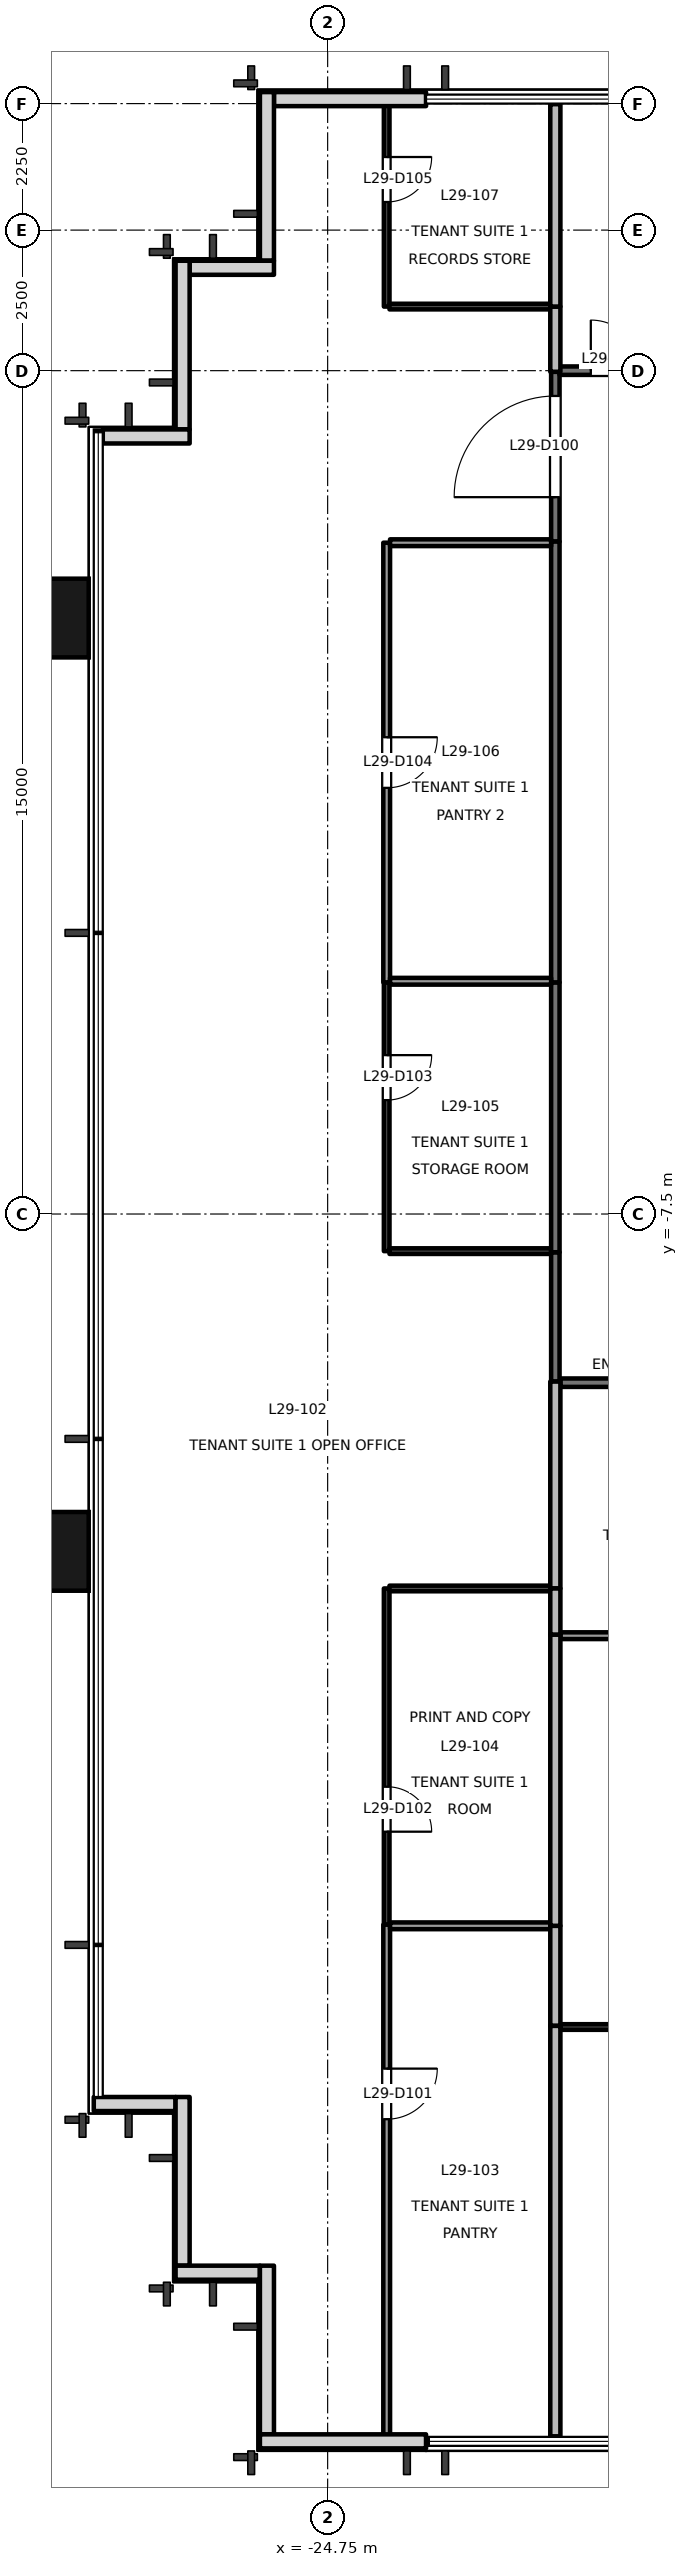
"""IFC4 building model, lengths in metres.
Left out: names, types, materials, properties, quantities, classifications, styles, units other than length and angle.
Written with IfcOpenShell. Run it as: python <this file> out.ifc"""

import sys

from ifc_helpers import new_model, si_unit, direction, frame, frame_2d, origin, origin_2d, place, context, subcontext, project, spatial, rectangle, extrude, element, fill, save


model = new_model("IFC4")
c1 = context("Model", 3, precision=1e-05, world=origin(), true_north=direction((0.0, 1.0)))
c2 = subcontext(c1, "Body", "Model", "MODEL_VIEW")
j1 = project(units=[si_unit("LENGTHUNIT", "METRE"), si_unit("PLANEANGLEUNIT", "RADIAN")], contexts=[c1])
p1 = place(None, origin())
s1 = spatial("IfcSite", under=j1, at=p1, CompositionType="ELEMENT")
p2 = place(p1, origin())
s2 = spatial("IfcBuilding", under=s1, at=p2, CompositionType="ELEMENT")
p3 = place(p2, frame((0.0, 0.0, 130.1)))
s3 = spatial("IfcBuildingStorey", under=s2, at=p3, CompositionType="ELEMENT", Elevation=130.1)
for number, where, z_axis, x_axis in (
    (1, (-29.9, -13.5, -0.2), (0.0, 0.0, 1.0), (0.0, 1.0, 0.0)),
    (2, (-29.9, 3.1, -0.2), (0.0, 0.0, 1.0), (0.0, 1.0, 0.0)),
):
    element("IfcColumn", number, at=place(p3, frame(where, z_axis=z_axis, x_axis=x_axis)), inside=s3, PredefinedType="COLUMN", context=c2, shape_type="SweptSolid", body=[
        extrude(rectangle(XDim=1.4, YDim=1.8, at=origin_2d()), origin(), (0.0, 0.0, 1.0), 4.0),
    ])
p4 = place(p3, frame((-23.0, 12.33, 0.0), z_axis=(0.0, 0.0, 1.0), x_axis=(-1.0, 0.0, 0.0)))
e3 = element("IfcWall", 3, at=p4, inside=s3, PredefinedType="SOLIDWALL", context=c2, shape_type="SweptSolid", body=[
    extrude(rectangle(XDim=2.705, YDim=0.25, at=frame_2d((1.353, 0.0))), origin(), (0.0, 0.0, 1.0), 3.8),
])
p5 = place(p3, frame((-25.83, 12.455, 0.0), z_axis=(0.0, 0.0, 1.0), x_axis=(0.0, -1.0, 0.0)))
e4 = element("IfcWall", 4, at=p5, inside=s3, PredefinedType="SOLIDWALL", context=c2, shape_type="SweptSolid", body=[
    extrude(rectangle(XDim=3.0, YDim=0.25, at=frame_2d((1.5, 0.0))), origin(), (0.0, 0.0, 1.0), 3.8),
])
p6 = place(p3, frame((-25.705, 9.33, 0.0), z_axis=(0.0, 0.0, 1.0), x_axis=(-1.0, 0.0, 0.0)))
e5 = element("IfcWall", 5, at=p6, inside=s3, PredefinedType="SOLIDWALL", context=c2, shape_type="SweptSolid", body=[
    extrude(rectangle(XDim=1.5, YDim=0.25, at=frame_2d((0.75, 0.0))), origin(), (0.0, 0.0, 1.0), 3.8),
])
p7 = place(p3, frame((-27.33, 9.455, 0.0), z_axis=(0.0, 0.0, 1.0), x_axis=(0.0, -1.0, 0.0)))
e6 = element("IfcWall", 6, at=p7, inside=s3, PredefinedType="SOLIDWALL", context=c2, shape_type="SweptSolid", body=[
    extrude(rectangle(XDim=3.0, YDim=0.25, at=frame_2d((1.5, 0.0))), origin(), (0.0, 0.0, 1.0), 3.8),
])
p8 = place(p3, frame((-27.205, 6.33, 0.0), z_axis=(0.0, 0.0, 1.0), x_axis=(-1.0, 0.0, 0.0)))
e7 = element("IfcWall", 7, at=p8, inside=s3, PredefinedType="SOLIDWALL", context=c2, shape_type="SweptSolid", body=[
    extrude(rectangle(XDim=1.545, YDim=0.25, at=frame_2d((0.772, 0.0))), origin(), (0.0, 0.0, 1.0), 3.8),
])
p9 = place(p3, frame((-28.91, -23.33, 0.0), z_axis=(0.0, 0.0, 1.0), x_axis=(1.0, 0.0, 0.0)))
e8 = element("IfcWall", 8, at=p9, inside=s3, PredefinedType="SOLIDWALL", context=c2, shape_type="SweptSolid", body=[
    extrude(rectangle(XDim=1.455, YDim=0.25, at=frame_2d((0.728, 0.0))), origin(), (0.0, 0.0, 1.0), 3.8),
])
p10 = place(p3, frame((-27.33, -23.205, 0.0), z_axis=(0.0, 0.0, 1.0), x_axis=(0.0, -1.0, 0.0)))
e9 = element("IfcWall", 9, at=p10, inside=s3, PredefinedType="SOLIDWALL", context=c2, shape_type="SweptSolid", body=[
    extrude(rectangle(XDim=3.0, YDim=0.25, at=frame_2d((1.5, 0.0))), origin(), (0.0, 0.0, 1.0), 3.8),
])
p11 = place(p3, frame((-27.455, -26.33, 0.0), z_axis=(0.0, 0.0, 1.0), x_axis=(1.0, 0.0, 0.0)))
e10 = element("IfcWall", 10, at=p11, inside=s3, PredefinedType="SOLIDWALL", context=c2, shape_type="SweptSolid", body=[
    extrude(rectangle(XDim=1.5, YDim=0.25, at=frame_2d((0.75, 0.0))), origin(), (0.0, 0.0, 1.0), 3.8),
])
p12 = place(p3, frame((-25.83, -26.205, 0.0), z_axis=(0.0, 0.0, 1.0), x_axis=(0.0, -1.0, 0.0)))
e11 = element("IfcWall", 11, at=p12, inside=s3, PredefinedType="SOLIDWALL", context=c2, shape_type="SweptSolid", body=[
    extrude(rectangle(XDim=3.0, YDim=0.25, at=frame_2d((1.5, 0.0))), origin(), (0.0, 0.0, 1.0), 3.8),
])
p13 = place(p3, frame((-25.955, -29.33, 0.0), z_axis=(0.0, 0.0, 1.0), x_axis=(1.0, 0.0, 0.0)))
e12 = element("IfcWall", 12, at=p13, inside=s3, PredefinedType="SOLIDWALL", context=c2, shape_type="SweptSolid", body=[
    extrude(rectangle(XDim=2.955, YDim=0.25, at=frame_2d((1.478, 0.0))), origin(), (0.0, 0.0, 1.0), 3.8),
])
p14 = place(p3, frame((-20.7, -10.48, 0.0), z_axis=(0.0, 0.0, 1.0), x_axis=(0.0, 1.0, 0.0)))
e13 = element("IfcWall", 13, at=p14, inside=s3, PredefinedType="PARTITIONING", context=c2, shape_type="SweptSolid", body=[
    extrude(rectangle(XDim=2.3, YDim=0.15, at=frame_2d((1.15, 0.0))), origin(), (0.0, 0.0, 1.0), 3.8),
])
p15 = place(p3, frame((-20.7, 4.46, 0.0), z_axis=(0.0, 0.0, 1.0), x_axis=(0.0, 1.0, 0.0)))
e14 = element("IfcWall", 14, at=p15, inside=s3, PredefinedType="PARTITIONING", context=c2, shape_type="SweptSolid", body=[
    extrude(rectangle(XDim=3.02, YDim=0.15, at=frame_2d((1.51, 0.0))), origin(), (0.0, 0.0, 1.0), 3.3),
])
p16 = place(p15, frame((0.79, 0.0, 0.0)))
e15 = element("IfcOpeningElement", 15, at=p16, cuts=e14, PredefinedType="OPENING", context=c2, shape_type="SweptSolid", body=[
    extrude(rectangle(XDim=1.8, YDim=2.1, at=frame_2d((0.9, 1.05))), frame((0.0, 0.085, 0.0), z_axis=(0.0, -1.0, 0.0), x_axis=(1.0, 0.0, 0.0)), (0.0, 0.0, 1.0), 0.171),
])
p17 = place(p3, frame((-20.7, -8.18, 0.0), z_axis=(0.0, 0.0, 1.0), x_axis=(0.0, 1.0, 0.0)))
e16 = element("IfcWall", 16, at=p17, inside=s3, PredefinedType="PARTITIONING", context=c2, shape_type="SweptSolid", body=[
    extrude(rectangle(XDim=4.8, YDim=0.15, at=frame_2d((2.4, 0.0))), origin(), (0.0, 0.0, 1.0), 3.3),
])
p18 = place(p3, frame((-20.7, -3.38, 0.0), z_axis=(0.0, 0.0, 1.0), x_axis=(0.0, 1.0, 0.0)))
e17 = element("IfcWall", 17, at=p18, inside=s3, PredefinedType="PARTITIONING", context=c2, shape_type="SweptSolid", body=[
    extrude(rectangle(XDim=7.84, YDim=0.15, at=frame_2d((3.92, 0.0))), origin(), (0.0, 0.0, 1.0), 3.3),
])
p19 = place(p3, frame((-15.92, -10.5, 0.0), z_axis=(0.0, 0.0, 1.0), x_axis=(-1.0, 0.0, 0.0)))
e18 = element("IfcWall", 18, at=p19, inside=s3, PredefinedType="PARTITIONING", context=c2, shape_type="SweptSolid", body=[
    extrude(rectangle(XDim=4.69, YDim=0.15, at=frame_2d((2.345, 0.0))), origin(), (0.0, 0.0, 1.0), 3.8),
])
p20 = place(p3, frame((-20.625, 7.5, 0.0), z_axis=(0.0, 0.0, 1.0), x_axis=(1.0, 0.0, 0.0)))
e19 = element("IfcWall", 19, at=p20, inside=s3, PredefinedType="PARTITIONING", context=c2, shape_type="SweptSolid", body=[
    extrude(rectangle(XDim=2.625, YDim=0.15, at=frame_2d((1.312, 0.0))), origin(), (0.0, 0.0, 1.0), 3.8),
])
p21 = place(p20, frame((0.556, 0.0, 0.0)))
e20 = element("IfcOpeningElement", 20, at=p21, cuts=e19, PredefinedType="OPENING", context=c2, shape_type="SweptSolid", body=[
    extrude(rectangle(XDim=0.9, YDim=2.1, at=frame_2d((0.45, 1.05))), frame((0.0, 0.085, 0.0), z_axis=(0.0, -1.0, 0.0), x_axis=(1.0, 0.0, 0.0)), (0.0, 0.0, 1.0), 0.171),
])
p22 = place(p3, frame((-23.7, -20.14, 0.0), z_axis=(0.0, 0.0, 1.0), x_axis=(0.0, -1.0, 0.0)))
e21 = element("IfcWall", 21, at=p22, inside=s3, PredefinedType="PARTITIONING", context=c2, shape_type="SweptSolid", body=[
    extrude(rectangle(XDim=9.1, YDim=0.12, at=frame_2d((4.55, 0.0))), origin(), (0.0, 0.0, 1.0), 3.8),
])
p23 = place(p22, frame((2.56, 0.0, 0.0)))
e22 = element("IfcOpeningElement", 22, at=p23, cuts=e21, PredefinedType="OPENING", context=c2, shape_type="SweptSolid", body=[
    extrude(rectangle(XDim=0.9, YDim=2.1, at=frame_2d((0.45, 1.05))), frame((0.0, 0.071, 0.0), z_axis=(0.0, -1.0, 0.0), x_axis=(1.0, 0.0, 0.0)), (0.0, 0.0, 1.0), 0.141),
])
p24 = place(p3, frame((-23.7, -14.16, 0.0), z_axis=(0.0, 0.0, 1.0), x_axis=(0.0, -1.0, 0.0)))
e23 = element("IfcWall", 23, at=p24, inside=s3, PredefinedType="PARTITIONING", context=c2, shape_type="SweptSolid", body=[
    extrude(rectangle(XDim=5.98, YDim=0.1, at=frame_2d((2.99, 0.0))), origin(), (0.0, 0.0, 1.0), 3.8),
])
p25 = place(p24, frame((3.526, 0.0, 0.0)))
e24 = element("IfcOpeningElement", 24, at=p25, cuts=e23, PredefinedType="OPENING", context=c2, shape_type="SweptSolid", body=[
    extrude(rectangle(XDim=0.8, YDim=2.1, at=frame_2d((0.4, 1.05))), frame((0.0, 0.061, 0.0), z_axis=(0.0, -1.0, 0.0), x_axis=(1.0, 0.0, 0.0)), (0.0, 0.0, 1.0), 0.121),
])
p26 = place(p3, frame((-20.79, -14.16, 0.0), z_axis=(0.0, 0.0, 1.0), x_axis=(-1.0, 0.0, 0.0)))
e25 = element("IfcWall", 25, at=p26, inside=s3, PredefinedType="PARTITIONING", context=c2, shape_type="SweptSolid", body=[
    extrude(rectangle(XDim=2.86, YDim=0.1, at=frame_2d((1.43, 0.0))), origin(), (0.0, 0.0, 1.0), 3.8),
])
p27 = place(p3, frame((-23.7, -3.38, 0.0), z_axis=(0.0, 0.0, 1.0), x_axis=(0.0, -1.0, 0.0)))
e26 = element("IfcWall", 26, at=p27, inside=s3, PredefinedType="PARTITIONING", context=c2, shape_type="SweptSolid", body=[
    extrude(rectangle(XDim=4.78, YDim=0.1, at=frame_2d((2.39, 0.0))), origin(), (0.0, 0.0, 1.0), 3.3),
])
p28 = place(p27, frame((1.294, 0.0, 0.0)))
e27 = element("IfcOpeningElement", 27, at=p28, cuts=e26, PredefinedType="OPENING", context=c2, shape_type="SweptSolid", body=[
    extrude(rectangle(XDim=0.8, YDim=2.1, at=frame_2d((0.4, 1.05))), frame((0.0, 0.061, 0.0), z_axis=(0.0, -1.0, 0.0), x_axis=(1.0, 0.0, 0.0)), (0.0, 0.0, 1.0), 0.121),
])
p29 = place(p3, frame((-23.65, -8.16, 0.0), z_axis=(0.0, 0.0, 1.0), x_axis=(1.0, 0.0, 0.0)))
e28 = element("IfcWall", 28, at=p29, inside=s3, PredefinedType="PARTITIONING", context=c2, shape_type="SweptSolid", body=[
    extrude(rectangle(XDim=2.875, YDim=0.1, at=frame_2d((1.438, 0.0))), origin(), (0.0, 0.0, 1.0), 3.8),
])
p30 = place(p3, frame((-23.7, 4.44, 0.0), z_axis=(0.0, 0.0, 1.0), x_axis=(0.0, -1.0, 0.0)))
e29 = element("IfcWall", 29, at=p30, inside=s3, PredefinedType="PARTITIONING", context=c2, shape_type="SweptSolid", body=[
    extrude(rectangle(XDim=7.82, YDim=0.12, at=frame_2d((3.91, 0.0))), origin(), (0.0, 0.0, 1.0), 3.3),
])
p31 = place(p30, frame((3.46, 0.0, 0.0)))
e30 = element("IfcOpeningElement", 30, at=p31, cuts=e29, PredefinedType="OPENING", context=c2, shape_type="SweptSolid", body=[
    extrude(rectangle(XDim=0.9, YDim=2.1, at=frame_2d((0.45, 1.05))), frame((0.0, 0.071, 0.0), z_axis=(0.0, -1.0, 0.0), x_axis=(1.0, 0.0, 0.0)), (0.0, 0.0, 1.0), 0.141),
])
p32 = place(p3, frame((-20.775, 4.44, 0.0), z_axis=(0.0, 0.0, 1.0), x_axis=(-1.0, 0.0, 0.0)))
e31 = element("IfcWall", 31, at=p32, inside=s3, PredefinedType="PARTITIONING", context=c2, shape_type="SweptSolid", body=[
    extrude(rectangle(XDim=2.865, YDim=0.12, at=frame_2d((1.433, 0.0))), origin(), (0.0, 0.0, 1.0), 3.3),
])
p33 = place(p3, frame((-23.7, 12.24, 0.0), z_axis=(0.0, 0.0, 1.0), x_axis=(0.0, -1.0, 0.0)))
e32 = element("IfcWall", 32, at=p33, inside=s3, PredefinedType="PARTITIONING", context=c2, shape_type="SweptSolid", body=[
    extrude(rectangle(XDim=3.6, YDim=0.1, at=frame_2d((1.8, 0.0))), origin(), (0.0, 0.0, 1.0), 3.8),
])
p34 = place(p33, frame((0.94, 0.0, 0.0)))
e33 = element("IfcOpeningElement", 33, at=p34, cuts=e32, PredefinedType="OPENING", context=c2, shape_type="SweptSolid", body=[
    extrude(rectangle(XDim=0.8, YDim=2.1, at=frame_2d((0.4, 1.05))), frame((0.0, 0.061, 0.0), z_axis=(0.0, -1.0, 0.0), x_axis=(1.0, 0.0, 0.0)), (0.0, 0.0, 1.0), 0.121),
])
p35 = place(p3, frame((-23.65, 8.64, 0.0), z_axis=(0.0, 0.0, 1.0), x_axis=(1.0, 0.0, 0.0)))
e34 = element("IfcWall", 34, at=p35, inside=s3, PredefinedType="PARTITIONING", context=c2, shape_type="SweptSolid", body=[
    extrude(rectangle(XDim=2.86, YDim=0.1, at=frame_2d((1.43, 0.0))), origin(), (0.0, 0.0, 1.0), 3.8),
])
p36 = place(p3, frame((-20.7, -10.48, 0.0), z_axis=(0.0, 0.0, 1.0), x_axis=(0.0, -1.0, 0.0)))
e35 = element("IfcWall", 35, at=p36, inside=s3, PredefinedType="PARTITIONING", context=c2, shape_type="SweptSolid", body=[
    extrude(rectangle(XDim=3.68, YDim=0.18, at=frame_2d((1.84, 0.0))), origin(), (0.0, 0.0, 1.0), 3.8),
])
p37 = place(p3, frame((-20.7, 8.64, 0.0), z_axis=(0.0, 0.0, 1.0), x_axis=(0.0, -1.0, 0.0)))
e36 = element("IfcWall", 36, at=p37, inside=s3, PredefinedType="PARTITIONING", context=c2, shape_type="SweptSolid", body=[
    extrude(rectangle(XDim=1.16, YDim=0.18, at=frame_2d((0.58, 0.0))), origin(), (0.0, 0.0, 1.0), 3.8),
])
p38 = place(p3, frame((-23.64, -20.16, 0.0), z_axis=(0.0, 0.0, 1.0), x_axis=(1.0, 0.0, 0.0)))
e37 = element("IfcWall", 37, at=p38, inside=s3, PredefinedType="PARTITIONING", context=c2, shape_type="SweptSolid", body=[
    extrude(rectangle(XDim=2.85, YDim=0.12, at=frame_2d((1.425, 0.0))), origin(), (0.0, 0.0, 1.0), 3.8),
])
p39 = place(p3, frame((-20.7, -20.16, 0.0), z_axis=(0.0, 0.0, 1.0), x_axis=(0.0, -1.0, 0.0)))
e38 = element("IfcWall", 38, at=p39, inside=s3, PredefinedType="PARTITIONING", context=c2, shape_type="SweptSolid", body=[
    extrude(rectangle(XDim=1.78, YDim=0.18, at=frame_2d((0.89, 0.0))), origin(), (0.0, 0.0, 1.0), 3.8),
])
p40 = place(p3, frame((-20.7, -21.94, 0.0), z_axis=(0.0, 0.0, 1.0), x_axis=(0.0, -1.0, 0.0)))
e39 = element("IfcWall", 39, at=p40, inside=s3, PredefinedType="PARTITIONING", context=c2, shape_type="SweptSolid", body=[
    extrude(rectangle(XDim=7.3, YDim=0.18, at=frame_2d((3.65, 0.0))), origin(), (0.0, 0.0, 1.0), 3.8),
])
p41 = place(p3, frame((-20.7, -14.98, 0.0), z_axis=(0.0, 0.0, 1.0), x_axis=(0.0, -1.0, 0.0)))
e40 = element("IfcWall", 40, at=p41, inside=s3, PredefinedType="PARTITIONING", context=c2, shape_type="SweptSolid", body=[
    extrude(rectangle(XDim=5.18, YDim=0.18, at=frame_2d((2.59, 0.0))), origin(), (0.0, 0.0, 1.0), 3.8),
])
p42 = place(p3, frame((-20.7, -14.16, 0.0), z_axis=(0.0, 0.0, 1.0), x_axis=(0.0, -1.0, 0.0)))
e41 = element("IfcWall", 41, at=p42, inside=s3, PredefinedType="PARTITIONING", context=c2, shape_type="SweptSolid", body=[
    extrude(rectangle(XDim=0.82, YDim=0.18, at=frame_2d((0.41, 0.0))), origin(), (0.0, 0.0, 1.0), 3.8),
])
p43 = place(p3, frame((-23.64, -3.36, 0.0), z_axis=(0.0, 0.0, 1.0), x_axis=(1.0, 0.0, 0.0)))
e42 = element("IfcWall", 42, at=p43, inside=s3, PredefinedType="PARTITIONING", context=c2, shape_type="SweptSolid", body=[
    extrude(rectangle(XDim=2.865, YDim=0.12, at=frame_2d((1.433, 0.0))), origin(), (0.0, 0.0, 1.0), 3.8),
])
p44 = place(p3, frame((-20.7, 12.24, 0.0), z_axis=(0.0, 0.0, 1.0), x_axis=(0.0, -1.0, 0.0)))
e43 = element("IfcWall", 43, at=p44, inside=s3, PredefinedType="PARTITIONING", context=c2, shape_type="SweptSolid", body=[
    extrude(rectangle(XDim=3.6, YDim=0.18, at=frame_2d((1.8, 0.0))), origin(), (0.0, 0.0, 1.0), 3.8),
])
p45 = place(p3, frame((-13.85, -21.96, 0.0), z_axis=(0.0, 0.0, 1.0), x_axis=(-1.0, 0.0, 0.0)))
e44 = element("IfcWall", 44, at=p45, inside=s3, PredefinedType="PARTITIONING", context=c2, shape_type="SweptSolid", body=[
    extrude(rectangle(XDim=6.76, YDim=0.1, at=frame_2d((3.38, 0.0))), origin(), (0.0, 0.0, 1.0), 3.8),
])
p46 = place(p45, frame((2.48, 0.0, 0.9)))
e45 = element("IfcOpeningElement", 45, at=p46, cuts=e44, PredefinedType="OPENING", context=c2, shape_type="SweptSolid", body=[
    extrude(rectangle(XDim=1.8, YDim=1.2, at=frame_2d((0.9, 0.6))), frame((0.0, 0.061, 0.0), z_axis=(0.0, -1.0, 0.0), x_axis=(1.0, 0.0, 0.0)), (0.0, 0.0, 1.0), 0.121),
])
p47 = place(p3, frame((-20.61, -15.0, 0.0), z_axis=(0.0, 0.0, 1.0), x_axis=(1.0, 0.0, 0.0)))
e46 = element("IfcWall", 46, at=p47, inside=s3, PredefinedType="PARTITIONING", context=c2, shape_type="SweptSolid", body=[
    extrude(rectangle(XDim=4.73, YDim=0.12, at=frame_2d((2.365, 0.0))), origin(), (0.0, 0.0, 1.0), 3.8),
])
p48 = place(p47, frame((1.249, 0.0, 0.0)))
e47 = element("IfcOpeningElement", 47, at=p48, cuts=e46, PredefinedType="OPENING", context=c2, shape_type="SweptSolid", body=[
    extrude(rectangle(XDim=0.9, YDim=2.1, at=frame_2d((0.45, 1.05))), frame((0.0, 0.071, 0.0), z_axis=(0.0, -1.0, 0.0), x_axis=(1.0, 0.0, 0.0)), (0.0, 0.0, 1.0), 0.141),
])
p49 = place(p16, origin())
e48 = element("IfcDoor", 48, at=p49, inside=s3, OperationType="DOUBLE_DOOR_SINGLE_SWING", PredefinedType="DOOR", context=c2, shape_type="SweptSolid", body=[
    extrude(rectangle(XDim=1.8, YDim=2.1, at=frame_2d((0.9, 1.05))), frame((0.0, 0.025, 0.0), z_axis=(0.0, -1.0, 0.0), x_axis=(1.0, 0.0, 0.0)), (0.0, 0.0, 1.0), 0.05),
])
fill(e15, e48)
p50 = place(p23, origin())
e49 = element("IfcDoor", 49, at=p50, inside=s3, OperationType="SINGLE_SWING_LEFT", PredefinedType="DOOR", context=c2, shape_type="SweptSolid", body=[
    extrude(rectangle(XDim=0.9, YDim=2.1, at=frame_2d((0.45, 1.05))), frame((0.0, 0.025, 0.0), z_axis=(0.0, -1.0, 0.0), x_axis=(1.0, 0.0, 0.0)), (0.0, 0.0, 1.0), 0.05),
])
fill(e22, e49)
p51 = place(p25, origin())
e50 = element("IfcDoor", 50, at=p51, inside=s3, OperationType="SINGLE_SWING_RIGHT", PredefinedType="DOOR", context=c2, shape_type="SweptSolid", body=[
    extrude(rectangle(XDim=0.8, YDim=2.1, at=frame_2d((0.4, 1.05))), frame((0.0, 0.025, 0.0), z_axis=(0.0, -1.0, 0.0), x_axis=(1.0, 0.0, 0.0)), (0.0, 0.0, 1.0), 0.05),
])
fill(e24, e50)
p52 = place(p28, origin())
e51 = element("IfcDoor", 51, at=p52, inside=s3, OperationType="SINGLE_SWING_LEFT", PredefinedType="DOOR", context=c2, shape_type="SweptSolid", body=[
    extrude(rectangle(XDim=0.8, YDim=2.1, at=frame_2d((0.4, 1.05))), frame((0.0, 0.025, 0.0), z_axis=(0.0, -1.0, 0.0), x_axis=(1.0, 0.0, 0.0)), (0.0, 0.0, 1.0), 0.05),
])
fill(e27, e51)
p53 = place(p31, origin())
e52 = element("IfcDoor", 52, at=p53, inside=s3, OperationType="SINGLE_SWING_LEFT", PredefinedType="DOOR", context=c2, shape_type="SweptSolid", body=[
    extrude(rectangle(XDim=0.9, YDim=2.1, at=frame_2d((0.45, 1.05))), frame((0.0, 0.025, 0.0), z_axis=(0.0, -1.0, 0.0), x_axis=(1.0, 0.0, 0.0)), (0.0, 0.0, 1.0), 0.05),
])
fill(e30, e52)
p54 = place(p34, origin())
e53 = element("IfcDoor", 53, at=p54, inside=s3, OperationType="SINGLE_SWING_LEFT", PredefinedType="DOOR", context=c2, shape_type="SweptSolid", body=[
    extrude(rectangle(XDim=0.8, YDim=2.1, at=frame_2d((0.4, 1.05))), frame((0.0, 0.025, 0.0), z_axis=(0.0, -1.0, 0.0), x_axis=(1.0, 0.0, 0.0)), (0.0, 0.0, 1.0), 0.05),
])
fill(e33, e53)
p55 = place(p21, origin())
e54 = element("IfcDoor", 54, at=p55, inside=s3, OperationType="SINGLE_SWING_LEFT", PredefinedType="DOOR", context=c2, shape_type="SweptSolid", body=[
    extrude(rectangle(XDim=0.9, YDim=2.1, at=frame_2d((0.45, 1.05))), frame((0.0, 0.025, 0.0), z_axis=(0.0, -1.0, 0.0), x_axis=(1.0, 0.0, 0.0)), (0.0, 0.0, 1.0), 0.05),
])
fill(e20, e54)
save(model, sys.argv[1])
